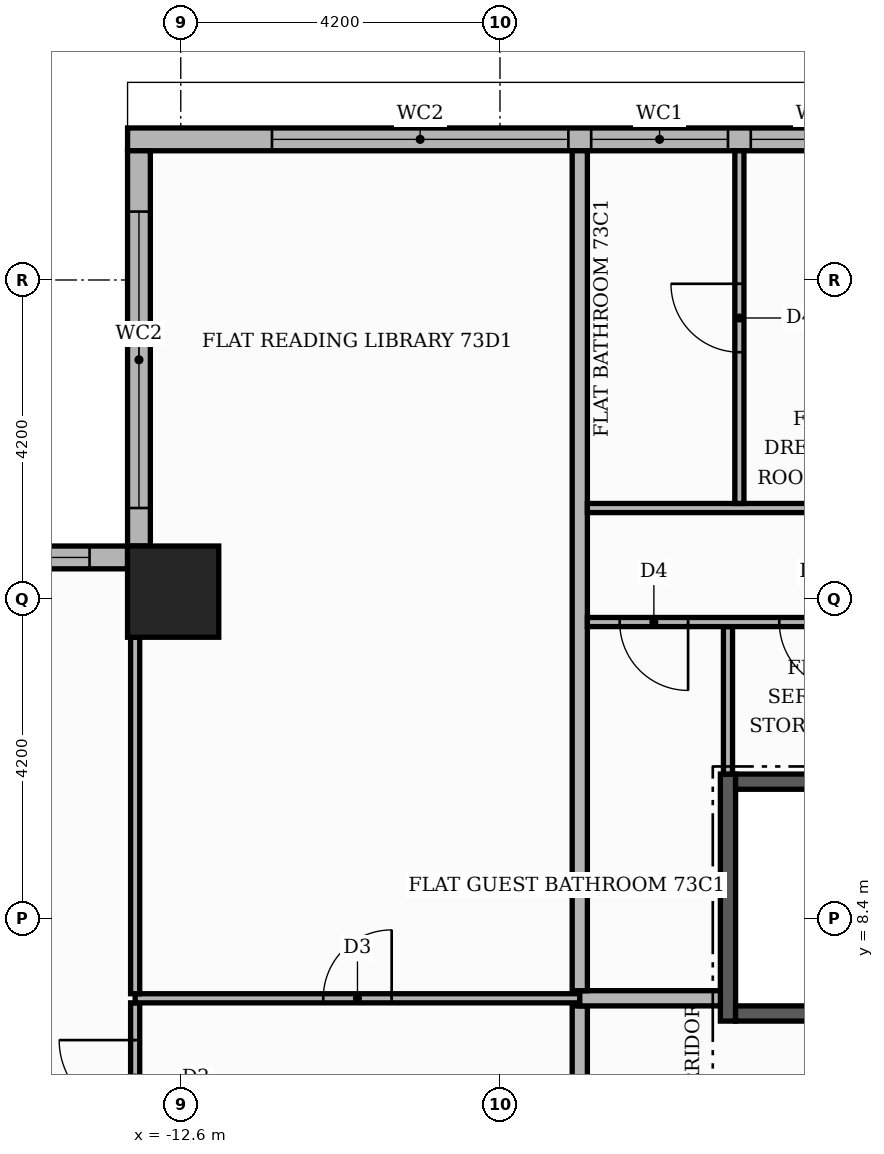
"""IFC4 building model, lengths in metres.
Left out: names, types, materials, properties, quantities, classifications, styles, units other than length and angle.
Written with IfcOpenShell. Run it as: python <this file> out.ifc"""

import sys

from ifc_helpers import new_model, si_unit, direction, frame, frame_2d, origin, origin_2d, place, context, subcontext, project, spatial, rectangle, extrude, element, fill, save


model = new_model("IFC4")
c1 = context("Model", 3, precision=1e-05, world=origin(), true_north=direction((0.0, 1.0)))
c2 = subcontext(c1, "Body", "Model", "MODEL_VIEW")
j1 = project(units=[si_unit("LENGTHUNIT", "METRE"), si_unit("PLANEANGLEUNIT", "RADIAN")], contexts=[c1])
p1 = place(None, origin())
s1 = spatial("IfcSite", under=j1, at=p1, CompositionType="ELEMENT")
p2 = place(p1, origin())
s2 = spatial("IfcBuilding", under=s1, at=p2, CompositionType="ELEMENT")
p3 = place(p2, frame((0.0, 0.0, 304.5)))
s3 = spatial("IfcBuildingStorey", under=s2, at=p3, CompositionType="ELEMENT", Elevation=304.5)
p4 = place(p3, frame((-5.4, 7.05, 0.0), z_axis=(0.0, 0.0, 1.0), x_axis=(0.0, 1.0, 0.0)))
e1 = element("IfcWall", 1, at=p4, inside=s3, PredefinedType="SHEAR", context=c2, shape_type="SweptSolid", body=[
    extrude(rectangle(XDim=3.25, YDim=0.2, at=frame_2d((1.625, 0.0))), origin(), (0.0, 0.0, 1.0), 3.55),
])
p5 = place(p3, frame((-5.3, 7.15, 0.0), z_axis=(0.0, 0.0, 1.0), x_axis=(1.0, 0.0, 0.0)))
e2 = element("IfcWall", 2, at=p5, inside=s3, PredefinedType="SHEAR", context=c2, shape_type="SweptSolid", body=[
    extrude(rectangle(XDim=6.4, YDim=0.2, at=frame_2d((3.2, 0.0))), origin(), (0.0, 0.0, 1.0), 3.55),
])
p6 = place(p5, frame((5.25, 0.0, 0.0)))
e3 = element("IfcOpeningElement", 3, at=p6, cuts=e2, PredefinedType="OPENING", context=c2, shape_type="SweptSolid", body=[
    extrude(rectangle(XDim=1.0, YDim=2.1, at=frame_2d((0.5, 1.05))), frame((0.0, 0.11, 0.0), z_axis=(0.0, -1.0, 0.0), x_axis=(1.0, 0.0, 0.0)), (0.0, 0.0, 1.0), 0.22),
])
p7 = place(p3, frame((-5.3, 10.2, 0.0), z_axis=(0.0, 0.0, 1.0), x_axis=(1.0, 0.0, 0.0)))
e4 = element("IfcWall", 4, at=p7, inside=s3, PredefinedType="SHEAR", context=c2, shape_type="SweptSolid", body=[
    extrude(rectangle(XDim=6.4, YDim=0.2, at=frame_2d((3.2, 0.0))), origin(), (0.0, 0.0, 1.0), 3.55),
])
p8 = place(p3, frame((-12.7, 12.7, 0.0), z_axis=(0.0, 0.0, 1.0), x_axis=(1.0, 0.0, 0.0)))
e5 = element("IfcColumn", 5, at=p8, inside=s3, PredefinedType="COLUMN", context=c2, shape_type="SweptSolid", body=[
    extrude(rectangle(XDim=1.2, YDim=1.2, at=origin_2d()), origin(), (0.0, 0.0, 1.0), 3.9),
])
p9 = place(p3, frame((13.0, 18.65, 0.0), z_axis=(0.0, 0.0, 1.0), x_axis=(-1.0, 0.0, 0.0)))
e6 = element("IfcWall", 6, at=p9, inside=s3, PredefinedType="STANDARD", context=c2, shape_type="SweptSolid", body=[
    extrude(rectangle(XDim=26.3, YDim=0.3, at=frame_2d((13.15, 0.0))), origin(), (0.0, 0.0, 1.0), 3.55),
])
p10 = place(p9, frame((1.6, 0.0, 0.6)))
e7 = element("IfcOpeningElement", 7, at=p10, cuts=e6, PredefinedType="OPENING", context=c2, shape_type="SweptSolid", body=[
    extrude(rectangle(XDim=6.0, YDim=2.4, at=frame_2d((3.0, 1.2))), frame((0.0, 0.16, 0.0), z_axis=(0.0, -1.0, 0.0), x_axis=(1.0, 0.0, 0.0)), (0.0, 0.0, 1.0), 0.32),
])
p11 = place(p9, frame((7.9, 0.0, 0.6)))
e8 = element("IfcOpeningElement", 8, at=p11, cuts=e6, PredefinedType="OPENING", context=c2, shape_type="SweptSolid", body=[
    extrude(rectangle(XDim=6.0, YDim=2.4, at=frame_2d((3.0, 1.2))), frame((0.0, 0.16, 0.0), z_axis=(0.0, -1.0, 0.0), x_axis=(1.0, 0.0, 0.0)), (0.0, 0.0, 1.0), 0.32),
])
p12 = place(p9, frame((14.2, 0.0, 0.6)))
e9 = element("IfcOpeningElement", 9, at=p12, cuts=e6, PredefinedType="OPENING", context=c2, shape_type="SweptSolid", body=[
    extrude(rectangle(XDim=1.8, YDim=2.4, at=frame_2d((0.9, 1.2))), frame((0.0, 0.16, 0.0), z_axis=(0.0, -1.0, 0.0), x_axis=(1.0, 0.0, 0.0)), (0.0, 0.0, 1.0), 0.32),
])
p13 = place(p9, frame((16.3, 0.0, 0.6)))
e10 = element("IfcOpeningElement", 10, at=p13, cuts=e6, PredefinedType="OPENING", context=c2, shape_type="SweptSolid", body=[
    extrude(rectangle(XDim=1.8, YDim=2.4, at=frame_2d((0.9, 1.2))), frame((0.0, 0.16, 0.0), z_axis=(0.0, -1.0, 0.0), x_axis=(1.0, 0.0, 0.0)), (0.0, 0.0, 1.0), 0.32),
])
p14 = place(p9, frame((18.4, 0.0, 0.6)))
e11 = element("IfcOpeningElement", 11, at=p14, cuts=e6, PredefinedType="OPENING", context=c2, shape_type="SweptSolid", body=[
    extrude(rectangle(XDim=1.8, YDim=2.4, at=frame_2d((0.9, 1.2))), frame((0.0, 0.16, 0.0), z_axis=(0.0, -1.0, 0.0), x_axis=(1.0, 0.0, 0.0)), (0.0, 0.0, 1.0), 0.32),
])
p15 = place(p9, frame((20.5, 0.0, 0.6)))
e12 = element("IfcOpeningElement", 12, at=p15, cuts=e6, PredefinedType="OPENING", context=c2, shape_type="SweptSolid", body=[
    extrude(rectangle(XDim=3.9, YDim=2.4, at=frame_2d((1.95, 1.2))), frame((0.0, 0.16, 0.0), z_axis=(0.0, -1.0, 0.0), x_axis=(1.0, 0.0, 0.0)), (0.0, 0.0, 1.0), 0.32),
])
p16 = place(p3, frame((-13.15, 18.5, 0.0), z_axis=(0.0, 0.0, 1.0), x_axis=(0.0, -1.0, 0.0)))
e13 = element("IfcWall", 13, at=p16, inside=s3, PredefinedType="STANDARD", context=c2, shape_type="SweptSolid", body=[
    extrude(rectangle(XDim=5.2, YDim=0.3, at=frame_2d((2.6, 0.0))), origin(), (0.0, 0.0, 1.0), 3.55),
])
p17 = place(p16, frame((0.8, 0.0, 0.6)))
e14 = element("IfcOpeningElement", 14, at=p17, cuts=e13, PredefinedType="OPENING", context=c2, shape_type="SweptSolid", body=[
    extrude(rectangle(XDim=3.9, YDim=2.4, at=frame_2d((1.95, 1.2))), frame((0.0, 0.16, 0.0), z_axis=(0.0, -1.0, 0.0), x_axis=(1.0, 0.0, 0.0)), (0.0, 0.0, 1.0), 0.32),
])
p18 = place(p3, frame((-13.3, 13.15, 0.0), z_axis=(0.0, 0.0, 1.0), x_axis=(-1.0, 0.0, 0.0)))
e15 = element("IfcWall", 15, at=p18, inside=s3, PredefinedType="STANDARD", context=c2, shape_type="SweptSolid", body=[
    extrude(rectangle(XDim=5.5, YDim=0.3, at=frame_2d((2.75, 0.0))), origin(), (0.0, 0.0, 1.0), 3.55),
])
p19 = place(p18, frame((0.5, 0.0, 0.6)))
e16 = element("IfcOpeningElement", 16, at=p19, cuts=e15, PredefinedType="OPENING", context=c2, shape_type="SweptSolid", body=[
    extrude(rectangle(XDim=3.9, YDim=2.4, at=frame_2d((1.95, 1.2))), frame((0.0, 0.16, 0.0), z_axis=(0.0, -1.0, 0.0), x_axis=(1.0, 0.0, 0.0)), (0.0, 0.0, 1.0), 0.32),
])
p20 = place(p3, frame((-7.35, -7.25, 0.0), z_axis=(0.0, 0.0, 1.0), x_axis=(0.0, 1.0, 0.0)))
e17 = element("IfcWall", 17, at=p20, inside=s3, PredefinedType="PARTITIONING", context=c2, shape_type="SweptSolid", body=[
    extrude(rectangle(XDim=14.5, YDim=0.2, at=frame_2d((7.25, 0.0))), origin(), (0.0, 0.0, 1.0), 3.55),
])
p21 = place(p20, frame((10.9, 0.0, 0.0)))
e18 = element("IfcOpeningElement", 18, at=p21, cuts=e17, PredefinedType="OPENING", context=c2, shape_type="SweptSolid", body=[
    extrude(rectangle(XDim=1.1, YDim=2.4, at=frame_2d((0.55, 1.2))), frame((0.0, 0.11, 0.0), z_axis=(0.0, -1.0, 0.0), x_axis=(1.0, 0.0, 0.0)), (0.0, 0.0, 1.0), 0.22),
])
p22 = place(p3, frame((-13.2, 5.31, 0.0), z_axis=(0.0, 0.0, 1.0), x_axis=(0.0, 1.0, 0.0)))
e19 = element("IfcWall", 19, at=p22, inside=s3, PredefinedType="PARTITIONING", context=c2, shape_type="SweptSolid", body=[
    extrude(rectangle(XDim=1.98, YDim=0.12, at=frame_2d((0.99, 0.0))), origin(), (0.0, 0.0, 1.0), 3.55),
])
p23 = place(p22, frame((0.49, 0.0, 0.0)))
e20 = element("IfcOpeningElement", 20, at=p23, cuts=e19, PredefinedType="OPENING", context=c2, shape_type="SweptSolid", body=[
    extrude(rectangle(XDim=1.0, YDim=2.1, at=frame_2d((0.5, 1.05))), frame((0.0, 0.07, 0.0), z_axis=(0.0, -1.0, 0.0), x_axis=(1.0, 0.0, 0.0)), (0.0, 0.0, 1.0), 0.14),
])
p24 = place(p3, frame((-13.2, 7.35, 0.0), z_axis=(0.0, 0.0, 1.0), x_axis=(1.0, 0.0, 0.0)))
e21 = element("IfcWall", 21, at=p24, inside=s3, PredefinedType="PARTITIONING", context=c2, shape_type="SweptSolid", body=[
    extrude(rectangle(XDim=5.85, YDim=0.12, at=frame_2d((2.925, 0.0))), origin(), (0.0, 0.0, 1.0), 3.55),
])
p25 = place(p24, frame((2.475, 0.0, 0.0)))
e22 = element("IfcOpeningElement", 22, at=p25, cuts=e21, PredefinedType="OPENING", context=c2, shape_type="SweptSolid", body=[
    extrude(rectangle(XDim=0.9, YDim=2.1, at=frame_2d((0.45, 1.05))), frame((0.0, 0.07, 0.0), z_axis=(0.0, -1.0, 0.0), x_axis=(1.0, 0.0, 0.0)), (0.0, 0.0, 1.0), 0.14),
])
p26 = place(p3, frame((-7.35, 7.35, 0.0), z_axis=(0.0, 0.0, 1.0), x_axis=(1.0, 0.0, 0.0)))
e23 = element("IfcWall", 23, at=p26, inside=s3, PredefinedType="PARTITIONING", context=c2, shape_type="SweptSolid", body=[
    extrude(rectangle(XDim=1.85, YDim=0.2, at=frame_2d((0.925, 0.0))), origin(), (0.0, 0.0, 1.0), 3.55),
])
p27 = place(p3, frame((-13.2, 7.41, 0.0), z_axis=(0.0, 0.0, 1.0), x_axis=(0.0, 1.0, 0.0)))
e24 = element("IfcWall", 24, at=p27, inside=s3, PredefinedType="PARTITIONING", context=c2, shape_type="SweptSolid", body=[
    extrude(rectangle(XDim=4.69, YDim=0.12, at=frame_2d((2.345, 0.0))), origin(), (0.0, 0.0, 1.0), 3.55),
])
p28 = place(p3, frame((-7.35, 7.45, 0.0), z_axis=(0.0, 0.0, 1.0), x_axis=(0.0, 1.0, 0.0)))
e25 = element("IfcWall", 25, at=p28, inside=s3, PredefinedType="PARTITIONING", context=c2, shape_type="SweptSolid", body=[
    extrude(rectangle(XDim=11.05, YDim=0.2, at=frame_2d((5.525, 0.0))), origin(), (0.0, 0.0, 1.0), 3.55),
])
p29 = place(p3, frame((-5.4, 10.3, 0.0), z_axis=(0.0, 0.0, 1.0), x_axis=(0.0, 1.0, 0.0)))
e26 = element("IfcWall", 26, at=p29, inside=s3, PredefinedType="PARTITIONING", context=c2, shape_type="SweptSolid", body=[
    extrude(rectangle(XDim=1.94, YDim=0.12, at=frame_2d((0.97, 0.0))), origin(), (0.0, 0.0, 1.0), 3.55),
])
p30 = place(p3, frame((-7.25, 12.3, 0.0), z_axis=(0.0, 0.0, 1.0), x_axis=(1.0, 0.0, 0.0)))
e27 = element("IfcWall", 27, at=p30, inside=s3, PredefinedType="PARTITIONING", context=c2, shape_type="SweptSolid", body=[
    extrude(rectangle(XDim=8.3, YDim=0.12, at=frame_2d((4.15, 0.0))), origin(), (0.0, 0.0, 1.0), 3.55),
])
p31 = place(p30, frame((5.75, 0.0, 0.0)))
e28 = element("IfcOpeningElement", 28, at=p31, cuts=e27, PredefinedType="OPENING", context=c2, shape_type="SweptSolid", body=[
    extrude(rectangle(XDim=0.9, YDim=2.1, at=frame_2d((0.45, 1.05))), frame((0.0, 0.07, 0.0), z_axis=(0.0, -1.0, 0.0), x_axis=(1.0, 0.0, 0.0)), (0.0, 0.0, 1.0), 0.14),
])
p32 = place(p30, frame((2.525, 0.0, 0.0)))
e29 = element("IfcOpeningElement", 29, at=p32, cuts=e27, PredefinedType="OPENING", context=c2, shape_type="SweptSolid", body=[
    extrude(rectangle(XDim=0.9, YDim=2.1, at=frame_2d((0.45, 1.05))), frame((0.0, 0.07, 0.0), z_axis=(0.0, -1.0, 0.0), x_axis=(1.0, 0.0, 0.0)), (0.0, 0.0, 1.0), 0.14),
])
p33 = place(p30, frame((0.425, 0.0, 0.0)))
e30 = element("IfcOpeningElement", 30, at=p33, cuts=e27, PredefinedType="OPENING", context=c2, shape_type="SweptSolid", body=[
    extrude(rectangle(XDim=0.9, YDim=2.1, at=frame_2d((0.45, 1.05))), frame((0.0, 0.07, 0.0), z_axis=(0.0, -1.0, 0.0), x_axis=(1.0, 0.0, 0.0)), (0.0, 0.0, 1.0), 0.14),
])
p34 = place(p3, frame((-7.25, 13.8, 0.0), z_axis=(0.0, 0.0, 1.0), x_axis=(1.0, 0.0, 0.0)))
e31 = element("IfcWall", 31, at=p34, inside=s3, PredefinedType="PARTITIONING", context=c2, shape_type="SweptSolid", body=[
    extrude(rectangle(XDim=19.349, YDim=0.12, at=frame_2d((9.675, 0.0))), origin(), (0.0, 0.0, 1.0), 3.55),
])
p35 = place(p34, frame((13.05, 0.0, 0.0)))
e32 = element("IfcOpeningElement", 32, at=p35, cuts=e31, PredefinedType="OPENING", context=c2, shape_type="SweptSolid", body=[
    extrude(rectangle(XDim=1.0, YDim=2.1, at=frame_2d((0.5, 1.05))), frame((0.0, 0.07, 0.0), z_axis=(0.0, -1.0, 0.0), x_axis=(1.0, 0.0, 0.0)), (0.0, 0.0, 1.0), 0.14),
])
p36 = place(p34, frame((7.85, 0.0, 0.0)))
e33 = element("IfcOpeningElement", 33, at=p36, cuts=e31, PredefinedType="OPENING", context=c2, shape_type="SweptSolid", body=[
    extrude(rectangle(XDim=0.9, YDim=2.1, at=frame_2d((0.45, 1.05))), frame((0.0, 0.07, 0.0), z_axis=(0.0, -1.0, 0.0), x_axis=(1.0, 0.0, 0.0)), (0.0, 0.0, 1.0), 0.14),
])
p37 = place(p3, frame((-5.25, 13.86, 0.0), z_axis=(0.0, 0.0, 1.0), x_axis=(0.0, 1.0, 0.0)))
e34 = element("IfcWall", 34, at=p37, inside=s3, PredefinedType="PARTITIONING", context=c2, shape_type="SweptSolid", body=[
    extrude(rectangle(XDim=4.64, YDim=0.12, at=frame_2d((2.32, 0.0))), origin(), (0.0, 0.0, 1.0), 3.55),
])
p38 = place(p37, frame((1.99, 0.0, 0.0)))
e35 = element("IfcOpeningElement", 35, at=p38, cuts=e34, PredefinedType="OPENING", context=c2, shape_type="SweptSolid", body=[
    extrude(rectangle(XDim=0.9, YDim=2.1, at=frame_2d((0.45, 1.05))), frame((0.0, 0.07, 0.0), z_axis=(0.0, -1.0, 0.0), x_axis=(1.0, 0.0, 0.0)), (0.0, 0.0, 1.0), 0.14),
])
p39 = place(p13, origin())
e36 = element("IfcWindow", 36, at=p39, inside=s3, PartitioningType="SINGLE_PANEL", PredefinedType="WINDOW", context=c2, shape_type="SweptSolid", body=[
    extrude(rectangle(XDim=1.8, YDim=2.4, at=frame_2d((0.9, 1.2))), frame((0.0, 0.03, 0.0), z_axis=(0.0, -1.0, 0.0), x_axis=(1.0, 0.0, 0.0)), (0.0, 0.0, 1.0), 0.06),
])
fill(e10, e36)
p40 = place(p14, origin())
e37 = element("IfcWindow", 37, at=p40, inside=s3, PartitioningType="SINGLE_PANEL", PredefinedType="WINDOW", context=c2, shape_type="SweptSolid", body=[
    extrude(rectangle(XDim=1.8, YDim=2.4, at=frame_2d((0.9, 1.2))), frame((0.0, 0.03, 0.0), z_axis=(0.0, -1.0, 0.0), x_axis=(1.0, 0.0, 0.0)), (0.0, 0.0, 1.0), 0.06),
])
fill(e11, e37)
p41 = place(p15, origin())
e38 = element("IfcWindow", 38, at=p41, inside=s3, PartitioningType="SINGLE_PANEL", PredefinedType="WINDOW", context=c2, shape_type="SweptSolid", body=[
    extrude(rectangle(XDim=3.9, YDim=2.4, at=frame_2d((1.95, 1.2))), frame((0.0, 0.03, 0.0), z_axis=(0.0, -1.0, 0.0), x_axis=(1.0, 0.0, 0.0)), (0.0, 0.0, 1.0), 0.06),
])
fill(e12, e38)
p42 = place(p17, origin())
e39 = element("IfcWindow", 39, at=p42, inside=s3, PartitioningType="SINGLE_PANEL", PredefinedType="WINDOW", context=c2, shape_type="SweptSolid", body=[
    extrude(rectangle(XDim=3.9, YDim=2.4, at=frame_2d((1.95, 1.2))), frame((0.0, 0.03, 0.0), z_axis=(0.0, -1.0, 0.0), x_axis=(1.0, 0.0, 0.0)), (0.0, 0.0, 1.0), 0.06),
])
fill(e14, e39)
p43 = place(p19, origin())
e40 = element("IfcWindow", 40, at=p43, inside=s3, PartitioningType="SINGLE_PANEL", PredefinedType="WINDOW", context=c2, shape_type="SweptSolid", body=[
    extrude(rectangle(XDim=3.9, YDim=2.4, at=frame_2d((1.95, 1.2))), frame((0.0, 0.03, 0.0), z_axis=(0.0, -1.0, 0.0), x_axis=(1.0, 0.0, 0.0)), (0.0, 0.0, 1.0), 0.06),
])
fill(e16, e40)
p44 = place(p32, frame((0.9, 0.0, 0.0), z_axis=(0.0, 0.0, 1.0), x_axis=(-1.0, 0.0, 0.0)))
e41 = element("IfcDoor", 41, at=p44, inside=s3, OperationType="SINGLE_SWING_RIGHT", PredefinedType="DOOR", context=c2, shape_type="SweptSolid", body=[
    extrude(rectangle(XDim=0.9, YDim=2.1, at=frame_2d((0.45, 1.05))), frame((0.0, 0.025, 0.0), z_axis=(0.0, -1.0, 0.0), x_axis=(1.0, 0.0, 0.0)), (0.0, 0.0, 1.0), 0.05),
])
fill(e29, e41)
p45 = place(p33, frame((0.9, 0.0, 0.0), z_axis=(0.0, 0.0, 1.0), x_axis=(-1.0, 0.0, 0.0)))
e42 = element("IfcDoor", 42, at=p45, inside=s3, OperationType="SINGLE_SWING_RIGHT", PredefinedType="DOOR", context=c2, shape_type="SweptSolid", body=[
    extrude(rectangle(XDim=0.9, YDim=2.1, at=frame_2d((0.45, 1.05))), frame((0.0, 0.025, 0.0), z_axis=(0.0, -1.0, 0.0), x_axis=(1.0, 0.0, 0.0)), (0.0, 0.0, 1.0), 0.05),
])
fill(e30, e42)
p46 = place(p38, origin())
e43 = element("IfcDoor", 43, at=p46, inside=s3, OperationType="SINGLE_SWING_RIGHT", PredefinedType="DOOR", context=c2, shape_type="SweptSolid", body=[
    extrude(rectangle(XDim=0.9, YDim=2.1, at=frame_2d((0.45, 1.05))), frame((0.0, 0.025, 0.0), z_axis=(0.0, -1.0, 0.0), x_axis=(1.0, 0.0, 0.0)), (0.0, 0.0, 1.0), 0.05),
])
fill(e35, e43)
p47 = place(p25, origin())
e44 = element("IfcDoor", 44, at=p47, inside=s3, OperationType="SINGLE_SWING_RIGHT", PredefinedType="DOOR", context=c2, shape_type="SweptSolid", body=[
    extrude(rectangle(XDim=0.9, YDim=2.1, at=frame_2d((0.45, 1.05))), frame((0.0, 0.025, 0.0), z_axis=(0.0, -1.0, 0.0), x_axis=(1.0, 0.0, 0.0)), (0.0, 0.0, 1.0), 0.05),
])
fill(e22, e44)
p48 = place(p23, origin())
e45 = element("IfcDoor", 45, at=p48, inside=s3, OperationType="SINGLE_SWING_RIGHT", PredefinedType="DOOR", context=c2, shape_type="SweptSolid", body=[
    extrude(rectangle(XDim=1.0, YDim=2.1, at=frame_2d((0.5, 1.05))), frame((0.0, 0.025, 0.0), z_axis=(0.0, -1.0, 0.0), x_axis=(1.0, 0.0, 0.0)), (0.0, 0.0, 1.0), 0.05),
])
fill(e20, e45)
save(model, sys.argv[1])
